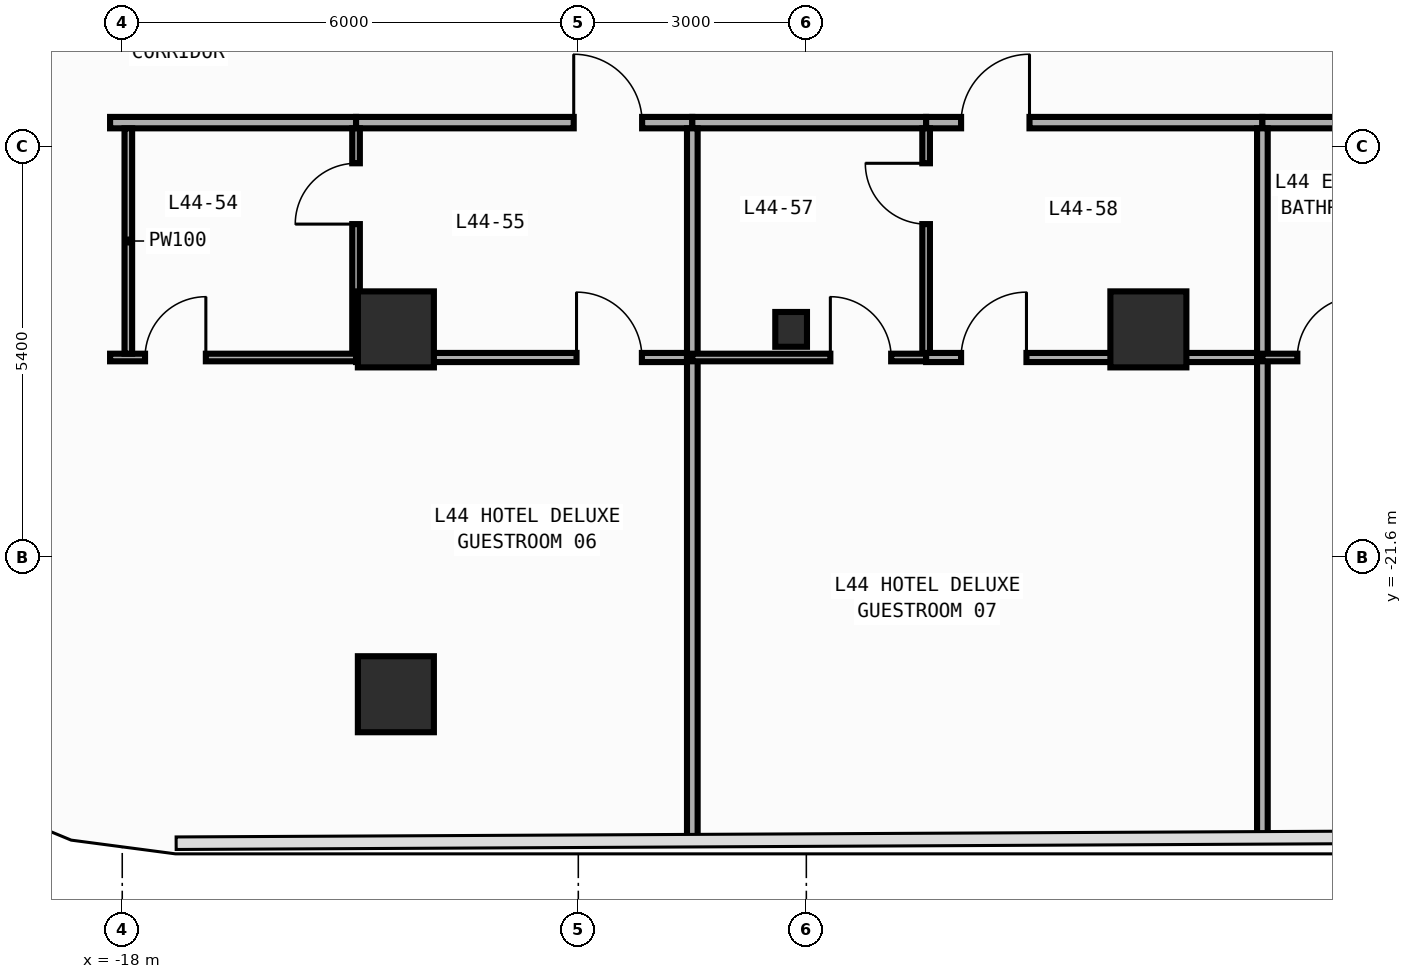
"""IFC4 building model, lengths in metres.
Left out: names, types, materials, properties, quantities, classifications, styles, units other than length and angle.
Written with IfcOpenShell. Run it as: python <this file> out.ifc"""

import sys

from ifc_helpers import new_model, si_unit, direction, frame, frame_2d, origin, origin_2d, place, context, subcontext, project, spatial, rectangle, i_section, extrude, element, fill, save


model = new_model("IFC4")
c1 = context("Model", 3, precision=1e-05, world=origin(), true_north=direction((0.0, 1.0)))
c2 = subcontext(c1, "Body", "Model", "MODEL_VIEW")
j1 = project(units=[si_unit("LENGTHUNIT", "METRE"), si_unit("PLANEANGLEUNIT", "RADIAN")], contexts=[c1])
p1 = place(None, origin())
s1 = spatial("IfcSite", under=j1, at=p1, CompositionType="ELEMENT")
p2 = place(p1, origin())
s2 = spatial("IfcBuilding", under=s1, at=p2, CompositionType="ELEMENT")
p3 = place(p2, frame((0.0, 0.0, 191.6)))
s3 = spatial("IfcBuildingStorey", under=s2, at=p3, CompositionType="ELEMENT", Elevation=191.6)
p4 = place(p3, frame((-9.2, -18.6, 0.0), z_axis=(0.0, 0.0, 1.0), x_axis=(1.0, 0.0, 0.0)))
e1 = element("IfcColumn", 1, at=p4, inside=s3, PredefinedType="COLUMN", context=c2, shape_type="SweptSolid", body=[
    extrude(i_section(OverallWidth=0.417, OverallDepth=0.458, WebThickness=0.03, FlangeThickness=0.05, FilletRadius=0.022, at=origin_2d()), origin(), (0.0, 0.0, 1.0), 3.8),
])
for number, where, z_axis, x_axis in (
    (2, (-14.4, -18.6, 0.0), (0.0, 0.0, 1.0), (1.0, 0.0, 0.0)),
    (3, (-4.5, -18.6, 0.0), (0.0, 0.0, 1.0), (1.0, 0.0, 0.0)),
    (4, (-14.4, -23.4, 0.0), (0.0, 0.0, 1.0), (1.0, 0.0, 0.0)),
):
    element("IfcColumn", number, at=place(p3, frame(where, z_axis=z_axis, x_axis=x_axis)), inside=s3, PredefinedType="COLUMN", context=c2, shape_type="SweptSolid", body=[
        extrude(rectangle(XDim=1.0, YDim=1.0, at=origin_2d()), origin(), (0.0, 0.0, 1.0), 3.8),
    ])
p5 = place(p3, frame((-18.16, -15.88, 0.0), z_axis=(0.0, 0.0, 1.0), x_axis=(1.0, 0.0, 0.0)))
e5 = element("IfcWall", 5, at=p5, inside=s3, PredefinedType="PARTITIONING", context=c2, shape_type="SweptSolid", body=[
    extrude(rectangle(XDim=3.236, YDim=0.15, at=frame_2d((1.618, 0.0))), origin(), (0.0, 0.0, 1.0), 3.54),
])
p6 = place(p3, frame((-14.924, -15.88, 0.0), z_axis=(0.0, 0.0, 1.0), x_axis=(1.0, 0.0, 0.0)))
e6 = element("IfcWall", 6, at=p6, inside=s3, PredefinedType="PARTITIONING", context=c2, shape_type="SweptSolid", body=[
    extrude(rectangle(XDim=4.424, YDim=0.15, at=frame_2d((2.212, 0.0))), origin(), (0.0, 0.0, 1.0), 3.54),
])
p7 = place(p6, frame((2.864, 0.0, 0.0)))
e7 = element("IfcOpeningElement", 7, at=p7, cuts=e6, PredefinedType="OPENING", context=c2, shape_type="SweptSolid", body=[
    extrude(rectangle(XDim=0.9, YDim=2.15, at=frame_2d((0.45, 1.075))), frame((0.0, 0.085, 0.0), z_axis=(0.0, -1.0, 0.0), x_axis=(1.0, 0.0, 0.0)), (0.0, 0.0, 1.0), 0.17),
])
p8 = place(p3, frame((-10.5, -15.88, 0.0), z_axis=(0.0, 0.0, 1.0), x_axis=(1.0, 0.0, 0.0)))
e8 = element("IfcWall", 8, at=p8, inside=s3, PredefinedType="PARTITIONING", context=c2, shape_type="SweptSolid", body=[
    extrude(rectangle(XDim=3.076, YDim=0.15, at=frame_2d((1.538, 0.0))), origin(), (0.0, 0.0, 1.0), 3.54),
])
p9 = place(p3, frame((-7.424, -15.88, 0.0), z_axis=(0.0, 0.0, 1.0), x_axis=(1.0, 0.0, 0.0)))
e9 = element("IfcWall", 9, at=p9, inside=s3, PredefinedType="PARTITIONING", context=c2, shape_type="SweptSolid", body=[
    extrude(rectangle(XDim=4.424, YDim=0.15, at=frame_2d((2.212, 0.0))), origin(), (0.0, 0.0, 1.0), 3.54),
])
p10 = place(p9, frame((0.46, 0.0, 0.0)))
e10 = element("IfcOpeningElement", 10, at=p10, cuts=e9, PredefinedType="OPENING", context=c2, shape_type="SweptSolid", body=[
    extrude(rectangle(XDim=0.9, YDim=2.15, at=frame_2d((0.45, 1.075))), frame((0.0, 0.085, 0.0), z_axis=(0.0, -1.0, 0.0), x_axis=(1.0, 0.0, 0.0)), (0.0, 0.0, 1.0), 0.17),
])
p11 = place(p3, frame((-3.0, -15.88, 0.0), z_axis=(0.0, 0.0, 1.0), x_axis=(1.0, 0.0, 0.0)))
e11 = element("IfcWall", 11, at=p11, inside=s3, PredefinedType="PARTITIONING", context=c2, shape_type="SweptSolid", body=[
    extrude(rectangle(XDim=3.476, YDim=0.15, at=frame_2d((1.738, 0.0))), origin(), (0.0, 0.0, 1.0), 3.54),
])
p12 = place(p3, frame((-14.924, -18.92, 0.0), z_axis=(0.0, 0.0, 1.0), x_axis=(0.0, 1.0, 0.0)))
e12 = element("IfcWall", 12, at=p12, inside=s3, PredefinedType="PARTITIONING", context=c2, shape_type="SweptSolid", body=[
    extrude(rectangle(XDim=2.965, YDim=0.1, at=frame_2d((1.482, 0.0))), origin(), (0.0, 0.0, 1.0), 3.54),
])
p13 = place(p12, frame((1.705, 0.0, 0.0)))
e13 = element("IfcOpeningElement", 13, at=p13, cuts=e12, PredefinedType="OPENING", context=c2, shape_type="SweptSolid", body=[
    extrude(rectangle(XDim=0.8, YDim=2.1, at=frame_2d((0.4, 1.05))), frame((0.0, 0.06, 0.0), z_axis=(0.0, -1.0, 0.0), x_axis=(1.0, 0.0, 0.0)), (0.0, 0.0, 1.0), 0.12),
])
p14 = place(p3, frame((-18.16, -18.97, 0.0), z_axis=(0.0, 0.0, 1.0), x_axis=(1.0, 0.0, 0.0)))
e14 = element("IfcWall", 14, at=p14, inside=s3, PredefinedType="PARTITIONING", context=c2, shape_type="SweptSolid", body=[
    extrude(rectangle(XDim=3.236, YDim=0.1, at=frame_2d((1.618, 0.0))), origin(), (0.0, 0.0, 1.0), 3.54),
])
p15 = place(p14, frame((0.46, 0.0, 0.0)))
e15 = element("IfcOpeningElement", 15, at=p15, cuts=e14, PredefinedType="OPENING", context=c2, shape_type="SweptSolid", body=[
    extrude(rectangle(XDim=0.8, YDim=2.1, at=frame_2d((0.4, 1.05))), frame((0.0, 0.06, 0.0), z_axis=(0.0, -1.0, 0.0), x_axis=(1.0, 0.0, 0.0)), (0.0, 0.0, 1.0), 0.12),
])
p16 = place(p3, frame((-14.924, -18.97, 0.0), z_axis=(0.0, 0.0, 1.0), x_axis=(1.0, 0.0, 0.0)))
e16 = element("IfcWall", 16, at=p16, inside=s3, PredefinedType="PARTITIONING", context=c2, shape_type="SweptSolid", body=[
    extrude(rectangle(XDim=4.424, YDim=0.12, at=frame_2d((2.212, 0.0))), origin(), (0.0, 0.0, 1.0), 3.54),
])
p17 = place(p16, frame((2.901, 0.0, 0.0)))
e17 = element("IfcOpeningElement", 17, at=p17, cuts=e16, PredefinedType="OPENING", context=c2, shape_type="SweptSolid", body=[
    extrude(rectangle(XDim=0.86, YDim=2.15, at=frame_2d((0.43, 1.075))), frame((0.0, 0.07, 0.0), z_axis=(0.0, -1.0, 0.0), x_axis=(1.0, 0.0, 0.0)), (0.0, 0.0, 1.0), 0.14),
])
p18 = place(p3, frame((-10.5, -18.97, 0.0), z_axis=(0.0, 0.0, 1.0), x_axis=(0.0, 1.0, 0.0)))
e18 = element("IfcWall", 18, at=p18, inside=s3, PredefinedType="PARTITIONING", context=c2, shape_type="SweptSolid", body=[
    extrude(rectangle(XDim=3.015, YDim=0.14, at=frame_2d((1.507, 0.0))), origin(), (0.0, 0.0, 1.0), 3.54),
])
p19 = place(p3, frame((-10.5, -25.322, 0.0), z_axis=(0.0, 0.0, 1.0), x_axis=(0.0, 1.0, 0.0)))
e19 = element("IfcWall", 19, at=p19, inside=s3, PredefinedType="PARTITIONING", context=c2, shape_type="SweptSolid", body=[
    extrude(rectangle(XDim=6.352, YDim=0.14, at=frame_2d((3.176, 0.0))), origin(), (0.0, 0.0, 1.0), 3.54),
])
p20 = place(p3, frame((-7.424, -18.92, 0.0), z_axis=(0.0, 0.0, 1.0), x_axis=(0.0, 1.0, 0.0)))
e20 = element("IfcWall", 20, at=p20, inside=s3, PredefinedType="PARTITIONING", context=c2, shape_type="SweptSolid", body=[
    extrude(rectangle(XDim=2.965, YDim=0.1, at=frame_2d((1.482, 0.0))), origin(), (0.0, 0.0, 1.0), 3.54),
])
p21 = place(p20, frame((1.705, 0.0, 0.0)))
e21 = element("IfcOpeningElement", 21, at=p21, cuts=e20, PredefinedType="OPENING", context=c2, shape_type="SweptSolid", body=[
    extrude(rectangle(XDim=0.8, YDim=2.1, at=frame_2d((0.4, 1.05))), frame((0.0, 0.06, 0.0), z_axis=(0.0, -1.0, 0.0), x_axis=(1.0, 0.0, 0.0)), (0.0, 0.0, 1.0), 0.12),
])
p22 = place(p3, frame((-10.5, -18.97, 0.0), z_axis=(0.0, 0.0, 1.0), x_axis=(1.0, 0.0, 0.0)))
e22 = element("IfcWall", 22, at=p22, inside=s3, PredefinedType="PARTITIONING", context=c2, shape_type="SweptSolid", body=[
    extrude(rectangle(XDim=3.076, YDim=0.1, at=frame_2d((1.538, 0.0))), origin(), (0.0, 0.0, 1.0), 3.54),
])
p23 = place(p22, frame((1.816, 0.0, 0.0)))
e23 = element("IfcOpeningElement", 23, at=p23, cuts=e22, PredefinedType="OPENING", context=c2, shape_type="SweptSolid", body=[
    extrude(rectangle(XDim=0.8, YDim=2.1, at=frame_2d((0.4, 1.05))), frame((0.0, 0.06, 0.0), z_axis=(0.0, -1.0, 0.0), x_axis=(1.0, 0.0, 0.0)), (0.0, 0.0, 1.0), 0.12),
])
p24 = place(p3, frame((-7.424, -18.97, 0.0), z_axis=(0.0, 0.0, 1.0), x_axis=(1.0, 0.0, 0.0)))
e24 = element("IfcWall", 24, at=p24, inside=s3, PredefinedType="PARTITIONING", context=c2, shape_type="SweptSolid", body=[
    extrude(rectangle(XDim=4.424, YDim=0.12, at=frame_2d((2.212, 0.0))), origin(), (0.0, 0.0, 1.0), 3.54),
])
p25 = place(p24, frame((0.46, 0.0, 0.0)))
e25 = element("IfcOpeningElement", 25, at=p25, cuts=e24, PredefinedType="OPENING", context=c2, shape_type="SweptSolid", body=[
    extrude(rectangle(XDim=0.86, YDim=2.15, at=frame_2d((0.43, 1.075))), frame((0.0, 0.07, 0.0), z_axis=(0.0, -1.0, 0.0), x_axis=(1.0, 0.0, 0.0)), (0.0, 0.0, 1.0), 0.14),
])
p26 = place(p3, frame((-3.0, -18.97, 0.0), z_axis=(0.0, 0.0, 1.0), x_axis=(0.0, 1.0, 0.0)))
e26 = element("IfcWall", 26, at=p26, inside=s3, PredefinedType="PARTITIONING", context=c2, shape_type="SweptSolid", body=[
    extrude(rectangle(XDim=3.015, YDim=0.14, at=frame_2d((1.507, 0.0))), origin(), (0.0, 0.0, 1.0), 3.54),
])
p27 = place(p3, frame((-3.0, -25.285, 0.0), z_axis=(0.0, 0.0, 1.0), x_axis=(0.0, 1.0, 0.0)))
e27 = element("IfcWall", 27, at=p27, inside=s3, PredefinedType="PARTITIONING", context=c2, shape_type="SweptSolid", body=[
    extrude(rectangle(XDim=6.315, YDim=0.14, at=frame_2d((3.157, 0.0))), origin(), (0.0, 0.0, 1.0), 3.54),
])
p28 = place(p3, frame((-3.0, -18.97, 0.0), z_axis=(0.0, 0.0, 1.0), x_axis=(1.0, 0.0, 0.0)))
e28 = element("IfcWall", 28, at=p28, inside=s3, PredefinedType="PARTITIONING", context=c2, shape_type="SweptSolid", body=[
    extrude(rectangle(XDim=3.476, YDim=0.1, at=frame_2d((1.738, 0.0))), origin(), (0.0, 0.0, 1.0), 3.54),
])
p29 = place(p28, frame((0.46, 0.0, 0.0)))
e29 = element("IfcOpeningElement", 29, at=p29, cuts=e28, PredefinedType="OPENING", context=c2, shape_type="SweptSolid", body=[
    extrude(rectangle(XDim=0.8, YDim=2.1, at=frame_2d((0.4, 1.05))), frame((0.0, 0.06, 0.0), z_axis=(0.0, -1.0, 0.0), x_axis=(1.0, 0.0, 0.0)), (0.0, 0.0, 1.0), 0.12),
])
p30 = place(p3, frame((-17.92, -18.92, 0.0), z_axis=(0.0, 0.0, 1.0), x_axis=(0.0, 1.0, 0.0)))
e30 = element("IfcWall", 30, at=p30, inside=s3, PredefinedType="PARTITIONING", context=c2, shape_type="SweptSolid", body=[
    extrude(rectangle(XDim=2.965, YDim=0.1, at=frame_2d((1.482, 0.0))), origin(), (0.0, 0.0, 1.0), 3.54),
])
p31 = place(p7, origin())
e31 = element("IfcDoor", 31, at=p31, inside=s3, OperationType="SINGLE_SWING_LEFT", PredefinedType="DOOR", context=c2, shape_type="SweptSolid", body=[
    extrude(rectangle(XDim=0.9, YDim=2.15, at=frame_2d((0.45, 1.075))), frame((0.0, 0.025, 0.0), z_axis=(0.0, -1.0, 0.0), x_axis=(1.0, 0.0, 0.0)), (0.0, 0.0, 1.0), 0.05),
])
fill(e7, e31)
p32 = place(p10, origin())
e32 = element("IfcDoor", 32, at=p32, inside=s3, OperationType="SINGLE_SWING_RIGHT", PredefinedType="DOOR", context=c2, shape_type="SweptSolid", body=[
    extrude(rectangle(XDim=0.9, YDim=2.15, at=frame_2d((0.45, 1.075))), frame((0.0, 0.025, 0.0), z_axis=(0.0, -1.0, 0.0), x_axis=(1.0, 0.0, 0.0)), (0.0, 0.0, 1.0), 0.05),
])
fill(e10, e32)
p33 = place(p13, origin())
e33 = element("IfcDoor", 33, at=p33, inside=s3, OperationType="SINGLE_SWING_LEFT", PredefinedType="DOOR", context=c2, shape_type="SweptSolid", body=[
    extrude(rectangle(XDim=0.8, YDim=2.1, at=frame_2d((0.4, 1.05))), frame((0.0, 0.025, 0.0), z_axis=(0.0, -1.0, 0.0), x_axis=(1.0, 0.0, 0.0)), (0.0, 0.0, 1.0), 0.05),
])
fill(e13, e33)
p34 = place(p15, origin())
e34 = element("IfcDoor", 34, at=p34, inside=s3, OperationType="SINGLE_SWING_RIGHT", PredefinedType="DOOR", context=c2, shape_type="SweptSolid", body=[
    extrude(rectangle(XDim=0.8, YDim=2.1, at=frame_2d((0.4, 1.05))), frame((0.0, 0.025, 0.0), z_axis=(0.0, -1.0, 0.0), x_axis=(1.0, 0.0, 0.0)), (0.0, 0.0, 1.0), 0.05),
])
fill(e15, e34)
p35 = place(p17, origin())
e35 = element("IfcDoor", 35, at=p35, inside=s3, OperationType="SINGLE_SWING_LEFT", PredefinedType="DOOR", context=c2, shape_type="SweptSolid", body=[
    extrude(rectangle(XDim=0.86, YDim=2.15, at=frame_2d((0.43, 1.075))), frame((0.0, 0.025, 0.0), z_axis=(0.0, -1.0, 0.0), x_axis=(1.0, 0.0, 0.0)), (0.0, 0.0, 1.0), 0.05),
])
fill(e17, e35)
p36 = place(p21, origin())
e36 = element("IfcDoor", 36, at=p36, inside=s3, OperationType="SINGLE_SWING_RIGHT", PredefinedType="DOOR", context=c2, shape_type="SweptSolid", body=[
    extrude(rectangle(XDim=0.8, YDim=2.1, at=frame_2d((0.4, 1.05))), frame((0.0, 0.025, 0.0), z_axis=(0.0, -1.0, 0.0), x_axis=(1.0, 0.0, 0.0)), (0.0, 0.0, 1.0), 0.05),
])
fill(e21, e36)
p37 = place(p23, origin())
e37 = element("IfcDoor", 37, at=p37, inside=s3, OperationType="SINGLE_SWING_LEFT", PredefinedType="DOOR", context=c2, shape_type="SweptSolid", body=[
    extrude(rectangle(XDim=0.8, YDim=2.1, at=frame_2d((0.4, 1.05))), frame((0.0, 0.025, 0.0), z_axis=(0.0, -1.0, 0.0), x_axis=(1.0, 0.0, 0.0)), (0.0, 0.0, 1.0), 0.05),
])
fill(e23, e37)
p38 = place(p25, origin())
e38 = element("IfcDoor", 38, at=p38, inside=s3, OperationType="SINGLE_SWING_RIGHT", PredefinedType="DOOR", context=c2, shape_type="SweptSolid", body=[
    extrude(rectangle(XDim=0.86, YDim=2.15, at=frame_2d((0.43, 1.075))), frame((0.0, 0.025, 0.0), z_axis=(0.0, -1.0, 0.0), x_axis=(1.0, 0.0, 0.0)), (0.0, 0.0, 1.0), 0.05),
])
fill(e25, e38)
p39 = place(p29, origin())
e39 = element("IfcDoor", 39, at=p39, inside=s3, OperationType="SINGLE_SWING_RIGHT", PredefinedType="DOOR", context=c2, shape_type="SweptSolid", body=[
    extrude(rectangle(XDim=0.8, YDim=2.1, at=frame_2d((0.4, 1.05))), frame((0.0, 0.025, 0.0), z_axis=(0.0, -1.0, 0.0), x_axis=(1.0, 0.0, 0.0)), (0.0, 0.0, 1.0), 0.05),
])
fill(e29, e39)
save(model, sys.argv[1])
